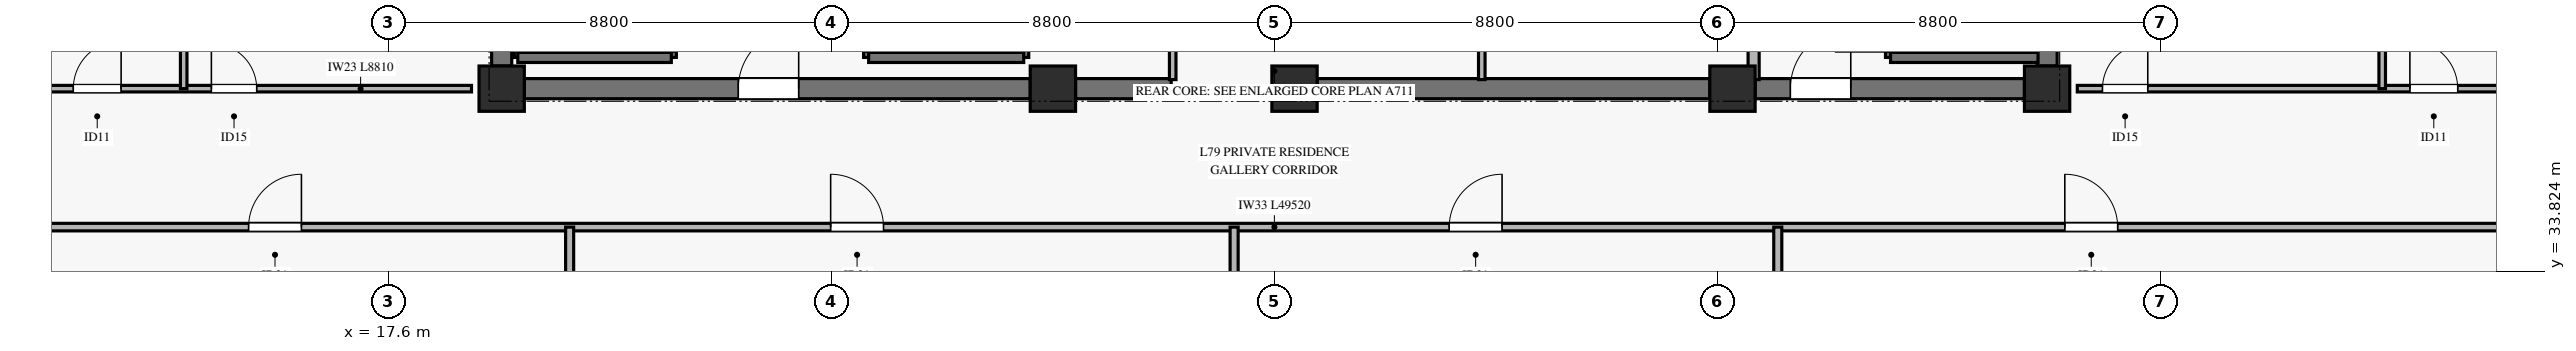
"""IFC4 building model, lengths in metres.
Left out: names, types, materials, properties, quantities, classifications, styles, units other than length and angle.
Written with IfcOpenShell. Run it as: python <this file> out.ifc"""

import sys

from ifc_helpers import new_model, si_unit, direction, frame, frame_2d, origin, origin_2d, place, context, subcontext, project, spatial, rectangle, extrude, source, transform, mapped, element, fill, save


model = new_model("IFC4")
c1 = context("Model", 3, precision=1e-05, world=origin(), true_north=direction((0.0, 1.0)))
c2 = subcontext(c1, "Body", "Model", "MODEL_VIEW")
j1 = project(units=[si_unit("LENGTHUNIT", "METRE"), si_unit("PLANEANGLEUNIT", "RADIAN")], contexts=[c1])
p1 = place(None, origin())
s1 = spatial("IfcSite", under=j1, at=p1, CompositionType="ELEMENT")
p2 = place(p1, origin())
s2 = spatial("IfcBuilding", under=s1, at=p2, CompositionType="ELEMENT")
p3 = place(p2, frame((0.0, 0.0, 307.4)))
s3 = spatial("IfcBuildingStorey", under=s2, at=p3, CompositionType="ELEMENT", Elevation=307.4)
m1 = source(origin(), c2, "Body", "SweptSolid", [
    extrude(rectangle(XDim=0.9, YDim=0.9, at=origin_2d()), origin(), (0.0, 0.0, 1.0), 3.185),
])
for number, where, z_axis, x_axis in (
    (1, (19.85, 37.45, 0.0), (0.0, 0.0, 1.0), (1.0, 0.0, 0.0)),
    (2, (30.8, 37.45, 0.0), (0.0, 0.0, 1.0), (1.0, 0.0, 0.0)),
    (3, (35.6, 37.45, 0.0), (0.0, 0.0, 1.0), (1.0, 0.0, 0.0)),
    (4, (44.3, 37.45, 0.0), (0.0, 0.0, 1.0), (1.0, 0.0, 0.0)),
    (5, (50.55, 37.45, 0.0), (0.0, 0.0, 1.0), (1.0, 0.0, 0.0)),
):
    element("IfcColumn", number, at=place(p3, frame(where, z_axis=z_axis, x_axis=x_axis)), inside=s3, PredefinedType="PILASTER", context=c2, shape_type="MappedRepresentation", body=[
        mapped(m1, transform((0.0, 0.0, 0.0), x_axis=(1.0, 0.0, 0.0), y_axis=(0.0, 1.0, 0.0), z_axis=(0.0, 0.0, 1.0), scale=1.0)),
    ])
p4 = place(p3, frame((20.3, 37.45, 0.0), z_axis=(0.0, 0.0, 1.0), x_axis=(1.0, 0.0, 0.0)))
e6 = element("IfcWall", 6, at=p4, inside=s3, PredefinedType="SHEAR", context=c2, shape_type="SweptSolid", body=[
    extrude(rectangle(XDim=10.05, YDim=0.4, at=frame_2d((5.025, 0.0))), origin(), (0.0, 0.0, 1.0), 3.185),
])
p5 = place(p4, frame((4.25, 0.0, 0.0)))
e7 = element("IfcOpeningElement", 7, at=p5, cuts=e6, PredefinedType="OPENING", context=c2, shape_type="SweptSolid", body=[
    extrude(rectangle(XDim=1.2, YDim=2.15, at=frame_2d((0.6, 1.075))), frame((0.0, 0.21, 0.0), z_axis=(0.0, -1.0, 0.0), x_axis=(1.0, 0.0, 0.0)), (0.0, 0.0, 1.0), 0.42),
])
p6 = place(p3, frame((31.25, 37.45, 0.0), z_axis=(0.0, 0.0, 1.0), x_axis=(1.0, 0.0, 0.0)))
e8 = element("IfcWall", 8, at=p6, inside=s3, PredefinedType="SHEAR", context=c2, shape_type="SweptSolid", body=[
    extrude(rectangle(XDim=1.9, YDim=0.4, at=frame_2d((0.95, 0.0))), origin(), (0.0, 0.0, 1.0), 3.185),
])
p7 = place(p3, frame((36.05, 37.45, 0.0), z_axis=(0.0, 0.0, 1.0), x_axis=(1.0, 0.0, 0.0)))
e9 = element("IfcWall", 9, at=p7, inside=s3, PredefinedType="SHEAR", context=c2, shape_type="SweptSolid", body=[
    extrude(rectangle(XDim=7.8, YDim=0.4, at=frame_2d((3.9, 0.0))), origin(), (0.0, 0.0, 1.0), 3.185),
])
p8 = place(p3, frame((44.75, 37.45, 0.0), z_axis=(0.0, 0.0, 1.0), x_axis=(1.0, 0.0, 0.0)))
e10 = element("IfcWall", 10, at=p8, inside=s3, PredefinedType="SHEAR", context=c2, shape_type="SweptSolid", body=[
    extrude(rectangle(XDim=5.35, YDim=0.4, at=frame_2d((2.675, 0.0))), origin(), (0.0, 0.0, 1.0), 3.185),
])
p9 = place(p8, frame((0.7, 0.0, 0.0)))
e11 = element("IfcOpeningElement", 11, at=p9, cuts=e10, PredefinedType="OPENING", context=c2, shape_type="SweptSolid", body=[
    extrude(rectangle(XDim=1.2, YDim=2.15, at=frame_2d((0.6, 1.075))), frame((0.0, 0.21, 0.0), z_axis=(0.0, -1.0, 0.0), x_axis=(1.0, 0.0, 0.0)), (0.0, 0.0, 1.0), 0.42),
])
for number, where, z_axis, x_axis in (
    (12, (19.85, 37.9, 0.0), (0.0, 0.0, 1.0), (0.0, 1.0, 0.0)),
    (13, (50.55, 37.9, 0.0), (0.0, 0.0, 1.0), (0.0, 1.0, 0.0)),
):
    element("IfcWall", number, at=place(p3, frame(where, z_axis=z_axis, x_axis=x_axis)), inside=s3, PredefinedType="SHEAR", context=c2, shape_type="SweptSolid", body=[
        extrude(rectangle(XDim=8.2, YDim=0.4, at=frame_2d((4.1, 0.0))), origin(), (0.0, 0.0, 1.0), 3.185),
    ])
p10 = place(p3, frame((20.17, 38.07, 0.0), z_axis=(0.0, 0.0, 1.0), x_axis=(0.0, 1.0, 0.0)))
e14 = element("IfcWall", 14, at=p10, inside=s3, PredefinedType="SOLIDWALL", context=c2, shape_type="SweptSolid", body=[
    extrude(rectangle(XDim=7.25, YDim=0.14, at=frame_2d((3.625, 0.0))), origin(), (0.0, 0.0, 1.0), 3.4),
])
p11 = place(p3, frame((23.22, 38.07, 0.0), z_axis=(0.0, 0.0, 1.0), x_axis=(0.0, 1.0, 0.0)))
e15 = element("IfcWall", 15, at=p11, inside=s3, PredefinedType="SOLIDWALL", context=c2, shape_type="SweptSolid", body=[
    extrude(rectangle(XDim=7.25, YDim=0.2, at=frame_2d((3.625, 0.0))), origin(), (0.0, 0.0, 1.0), 3.4),
])
p12 = place(p11, frame((0.11, 0.0, 0.0)))
e16 = element("IfcOpeningElement", 16, at=p12, cuts=e15, PredefinedType="OPENING", context=c2, shape_type="SweptSolid", body=[
    extrude(rectangle(XDim=1.1, YDim=2.15, at=frame_2d((0.55, 1.075))), frame((0.0, 0.11, 0.0), z_axis=(0.0, -1.0, 0.0), x_axis=(1.0, 0.0, 0.0)), (0.0, 0.0, 1.0), 0.22),
])
p13 = place(p3, frame((20.17, 38.07, 0.0), z_axis=(0.0, 0.0, 1.0), x_axis=(1.0, 0.0, 0.0)))
e17 = element("IfcWall", 17, at=p13, inside=s3, PredefinedType="SOLIDWALL", context=c2, shape_type="SweptSolid", body=[
    extrude(rectangle(XDim=3.05, YDim=0.2, at=frame_2d((1.525, 0.0))), origin(), (0.0, 0.0, 1.0), 3.4),
])
p14 = place(p3, frame((27.14, 38.07, 0.0), z_axis=(0.0, 0.0, 1.0), x_axis=(0.0, 1.0, 0.0)))
e18 = element("IfcWall", 18, at=p14, inside=s3, PredefinedType="SOLIDWALL", context=c2, shape_type="SweptSolid", body=[
    extrude(rectangle(XDim=7.25, YDim=0.2, at=frame_2d((3.625, 0.0))), origin(), (0.0, 0.0, 1.0), 3.4),
])
p15 = place(p14, frame((0.11, 0.0, 0.0)))
e19 = element("IfcOpeningElement", 19, at=p15, cuts=e18, PredefinedType="OPENING", context=c2, shape_type="SweptSolid", body=[
    extrude(rectangle(XDim=1.1, YDim=2.15, at=frame_2d((0.55, 1.075))), frame((0.0, 0.11, 0.0), z_axis=(0.0, -1.0, 0.0), x_axis=(1.0, 0.0, 0.0)), (0.0, 0.0, 1.0), 0.22),
])
p16 = place(p3, frame((30.22, 38.07, 0.0), z_axis=(0.0, 0.0, 1.0), x_axis=(0.0, 1.0, 0.0)))
e20 = element("IfcWall", 20, at=p16, inside=s3, PredefinedType="SOLIDWALL", context=c2, shape_type="SweptSolid", body=[
    extrude(rectangle(XDim=7.25, YDim=0.2, at=frame_2d((3.625, 0.0))), origin(), (0.0, 0.0, 1.0), 3.4),
])
p17 = place(p3, frame((27.14, 38.07, 0.0), z_axis=(0.0, 0.0, 1.0), x_axis=(1.0, 0.0, 0.0)))
e21 = element("IfcWall", 21, at=p17, inside=s3, PredefinedType="SOLIDWALL", context=c2, shape_type="SweptSolid", body=[
    extrude(rectangle(XDim=3.08, YDim=0.2, at=frame_2d((1.54, 0.0))), origin(), (0.0, 0.0, 1.0), 3.4),
])
p18 = place(p3, frame((47.44, 38.07, 0.0), z_axis=(0.0, 0.0, 1.0), x_axis=(0.0, 1.0, 0.0)))
e22 = element("IfcWall", 22, at=p18, inside=s3, PredefinedType="SOLIDWALL", context=c2, shape_type="SweptSolid", body=[
    extrude(rectangle(XDim=7.25, YDim=0.2, at=frame_2d((3.625, 0.0))), origin(), (0.0, 0.0, 1.0), 3.4),
])
p19 = place(p18, frame((0.11, 0.0, 0.0)))
e23 = element("IfcOpeningElement", 23, at=p19, cuts=e22, PredefinedType="OPENING", context=c2, shape_type="SweptSolid", body=[
    extrude(rectangle(XDim=1.1, YDim=2.15, at=frame_2d((0.55, 1.075))), frame((0.0, 0.11, 0.0), z_axis=(0.0, -1.0, 0.0), x_axis=(1.0, 0.0, 0.0)), (0.0, 0.0, 1.0), 0.22),
])
p20 = place(p3, frame((47.44, 38.07, 0.0), z_axis=(0.0, 0.0, 1.0), x_axis=(1.0, 0.0, 0.0)))
e24 = element("IfcWall", 24, at=p20, inside=s3, PredefinedType="SOLIDWALL", context=c2, shape_type="SweptSolid", body=[
    extrude(rectangle(XDim=2.93, YDim=0.2, at=frame_2d((1.465, 0.0))), origin(), (0.0, 0.0, 1.0), 3.4),
])
p21 = place(p3, frame((44.72, 37.63, 0.0), z_axis=(0.0, 0.0, 1.0), x_axis=(0.0, 1.0, 0.0)))
e25 = element("IfcWall", 25, at=p21, inside=s3, PredefinedType="SOLIDWALL", context=c2, shape_type="SweptSolid", body=[
    extrude(rectangle(XDim=7.59, YDim=0.22, at=frame_2d((3.795, 0.0))), origin(), (0.0, 0.0, 1.0), 3.185),
])
p22 = place(p3, frame((33.18, 37.63, 0.0), z_axis=(0.0, 0.0, 1.0), x_axis=(0.0, 1.0, 0.0)))
e26 = element("IfcWall", 26, at=p22, inside=s3, PredefinedType="PARTITIONING", context=c2, shape_type="SweptSolid", body=[
    extrude(rectangle(XDim=6.52, YDim=0.13, at=frame_2d((3.26, 0.0))), origin(), (0.0, 0.0, 1.0), 2.27),
])
p23 = place(p22, frame((2.27, 0.0, 0.0)))
e27 = element("IfcOpeningElement", 27, at=p23, cuts=e26, PredefinedType="OPENING", context=c2, shape_type="SweptSolid", body=[
    extrude(rectangle(XDim=0.9, YDim=2.1, at=frame_2d((0.45, 1.05))), frame((0.0, 0.075, 0.0), z_axis=(0.0, -1.0, 0.0), x_axis=(1.0, 0.0, 0.0)), (0.0, 0.0, 1.0), 0.15),
])
p24 = place(p3, frame((39.32, 37.63, 0.0), z_axis=(0.0, 0.0, 1.0), x_axis=(0.0, 1.0, 0.0)))
e28 = element("IfcWall", 28, at=p24, inside=s3, PredefinedType="PARTITIONING", context=c2, shape_type="SweptSolid", body=[
    extrude(rectangle(XDim=8.74, YDim=0.13, at=frame_2d((4.37, 0.0))), origin(), (0.0, 0.0, 1.0), 3.185),
])
p25 = place(p24, frame((4.89, 0.0, 0.0)))
e29 = element("IfcOpeningElement", 29, at=p25, cuts=e28, PredefinedType="OPENING", context=c2, shape_type="SweptSolid", body=[
    extrude(rectangle(XDim=0.9, YDim=2.1, at=frame_2d((0.45, 1.05))), frame((0.0, 0.075, 0.0), z_axis=(0.0, -1.0, 0.0), x_axis=(1.0, 0.0, 0.0)), (0.0, 0.0, 1.0), 0.15),
])
p26 = place(p3, frame((10.44, 34.7, 0.0), z_axis=(0.0, 0.0, 1.0), x_axis=(1.0, 0.0, 0.0)))
e30 = element("IfcWall", 30, at=p26, inside=s3, PredefinedType="PARTITIONING", context=c2, shape_type="SweptSolid", body=[
    extrude(rectangle(XDim=49.52, YDim=0.15, at=frame_2d((24.76, 0.0))), origin(), (0.0, 0.0, 1.0), 2.47),
])
p27 = place(p26, frame((4.382, 0.0, 0.0)))
e31 = element("IfcOpeningElement", 31, at=p27, cuts=e30, PredefinedType="OPENING", context=c2, shape_type="SweptSolid", body=[
    extrude(rectangle(XDim=1.05, YDim=2.15, at=frame_2d((0.525, 1.075))), frame((0.0, 0.085, 0.0), z_axis=(0.0, -1.0, 0.0), x_axis=(1.0, 0.0, 0.0)), (0.0, 0.0, 1.0), 0.17),
])
p28 = place(p26, frame((15.945, 0.0, 0.0)))
e32 = element("IfcOpeningElement", 32, at=p28, cuts=e30, PredefinedType="OPENING", context=c2, shape_type="SweptSolid", body=[
    extrude(rectangle(XDim=1.05, YDim=2.15, at=frame_2d((0.525, 1.075))), frame((0.0, 0.085, 0.0), z_axis=(0.0, -1.0, 0.0), x_axis=(1.0, 0.0, 0.0)), (0.0, 0.0, 1.0), 0.17),
])
p29 = place(p26, frame((28.233, 0.0, 0.0)))
e33 = element("IfcOpeningElement", 33, at=p29, cuts=e30, PredefinedType="OPENING", context=c2, shape_type="SweptSolid", body=[
    extrude(rectangle(XDim=1.05, YDim=2.15, at=frame_2d((0.525, 1.075))), frame((0.0, 0.085, 0.0), z_axis=(0.0, -1.0, 0.0), x_axis=(1.0, 0.0, 0.0)), (0.0, 0.0, 1.0), 0.17),
])
p30 = place(p26, frame((40.462, 0.0, 0.0)))
e34 = element("IfcOpeningElement", 34, at=p30, cuts=e30, PredefinedType="OPENING", context=c2, shape_type="SweptSolid", body=[
    extrude(rectangle(XDim=1.05, YDim=2.15, at=frame_2d((0.525, 1.075))), frame((0.0, 0.085, 0.0), z_axis=(0.0, -1.0, 0.0), x_axis=(1.0, 0.0, 0.0)), (0.0, 0.0, 1.0), 0.17),
])
for number, where, z_axis, x_axis in (
    (35, (21.2, 19.772, 0.0), (0.0, 0.0, 1.0), (0.0, 1.0, 0.0)),
    (36, (34.4, 19.772, 0.0), (0.0, 0.0, 1.0), (0.0, 1.0, 0.0)),
    (37, (45.2, 19.772, 0.0), (0.0, 0.0, 1.0), (0.0, 1.0, 0.0)),
):
    element("IfcWall", number, at=place(p3, frame(where, z_axis=z_axis, x_axis=x_axis)), inside=s3, PredefinedType="PARTITIONING", context=c2, shape_type="SweptSolid", body=[
        extrude(rectangle(XDim=14.928, YDim=0.16, at=frame_2d((7.464, 0.0))), origin(), (0.0, 0.0, 1.0), 2.77),
    ])
p31 = place(p3, frame((10.44, 37.45, 0.0), z_axis=(0.0, 0.0, 1.0), x_axis=(1.0, 0.0, 0.0)))
e38 = element("IfcWall", 38, at=p31, inside=s3, PredefinedType="PARTITIONING", context=c2, shape_type="SweptSolid", body=[
    extrude(rectangle(XDim=8.81, YDim=0.13, at=frame_2d((4.405, 0.0))), origin(), (0.0, 0.0, 1.0), 2.82),
])
p32 = place(p31, frame((0.9, 0.0, 0.0)))
e39 = element("IfcOpeningElement", 39, at=p32, cuts=e38, PredefinedType="OPENING", context=c2, shape_type="SweptSolid", body=[
    extrude(rectangle(XDim=0.95, YDim=2.1, at=frame_2d((0.475, 1.05))), frame((0.0, 0.075, 0.0), z_axis=(0.0, -1.0, 0.0), x_axis=(1.0, 0.0, 0.0)), (0.0, 0.0, 1.0), 0.15),
])
p33 = place(p31, frame((3.643, 0.0, 0.0)))
e40 = element("IfcOpeningElement", 40, at=p33, cuts=e38, PredefinedType="OPENING", context=c2, shape_type="SweptSolid", body=[
    extrude(rectangle(XDim=0.9, YDim=2.1, at=frame_2d((0.45, 1.05))), frame((0.0, 0.075, 0.0), z_axis=(0.0, -1.0, 0.0), x_axis=(1.0, 0.0, 0.0)), (0.0, 0.0, 1.0), 0.15),
])
p34 = place(p3, frame((13.533, 37.45, 0.0), z_axis=(0.0, 0.0, 1.0), x_axis=(0.0, 1.0, 0.0)))
e41 = element("IfcWall", 41, at=p34, inside=s3, PredefinedType="PARTITIONING", context=c2, shape_type="SweptSolid", body=[
    extrude(rectangle(XDim=8.8, YDim=0.13, at=frame_2d((4.4, 0.0))), origin(), (0.0, 0.0, 1.0), 3.185),
])
p35 = place(p3, frame((51.15, 37.45, 0.0), z_axis=(0.0, 0.0, 1.0), x_axis=(1.0, 0.0, 0.0)))
e42 = element("IfcWall", 42, at=p35, inside=s3, PredefinedType="PARTITIONING", context=c2, shape_type="SweptSolid", body=[
    extrude(rectangle(XDim=8.81, YDim=0.13, at=frame_2d((4.405, 0.0))), origin(), (0.0, 0.0, 1.0), 2.82),
])
p36 = place(p35, frame((0.5, 0.0, 0.0)))
e43 = element("IfcOpeningElement", 43, at=p36, cuts=e42, PredefinedType="OPENING", context=c2, shape_type="SweptSolid", body=[
    extrude(rectangle(XDim=0.9, YDim=2.1, at=frame_2d((0.45, 1.05))), frame((0.0, 0.075, 0.0), z_axis=(0.0, -1.0, 0.0), x_axis=(1.0, 0.0, 0.0)), (0.0, 0.0, 1.0), 0.15),
])
p37 = place(p35, frame((6.607, 0.0, 0.0)))
e44 = element("IfcOpeningElement", 44, at=p37, cuts=e42, PredefinedType="OPENING", context=c2, shape_type="SweptSolid", body=[
    extrude(rectangle(XDim=0.95, YDim=2.1, at=frame_2d((0.475, 1.05))), frame((0.0, 0.075, 0.0), z_axis=(0.0, -1.0, 0.0), x_axis=(1.0, 0.0, 0.0)), (0.0, 0.0, 1.0), 0.15),
])
p38 = place(p3, frame((57.207, 37.45, 0.0), z_axis=(0.0, 0.0, 1.0), x_axis=(0.0, 1.0, 0.0)))
e45 = element("IfcWall", 45, at=p38, inside=s3, PredefinedType="PARTITIONING", context=c2, shape_type="SweptSolid", body=[
    extrude(rectangle(XDim=8.8, YDim=0.13, at=frame_2d((4.4, 0.0))), origin(), (0.0, 0.0, 1.0), 2.82),
])
m2 = source(origin(), c2, "Body", "SweptSolid", [
    extrude(rectangle(XDim=1.2, YDim=2.15, at=frame_2d((0.6, 1.075))), frame((0.0, 0.025, 0.0), z_axis=(0.0, -1.0, 0.0), x_axis=(1.0, 0.0, 0.0)), (0.0, 0.0, 1.0), 0.05),
])
p39 = place(p5, origin())
e46 = element("IfcDoor", 46, at=p39, inside=s3, OperationType="SINGLE_SWING_RIGHT", PredefinedType="DOOR", context=c2, shape_type="MappedRepresentation", body=[
    mapped(m2, transform((0.0, 0.0, 0.0), x_axis=(1.0, 0.0, 0.0), y_axis=(0.0, 1.0, 0.0), z_axis=(0.0, 0.0, 1.0), scale=1.0)),
])
fill(e7, e46)
p40 = place(p9, origin())
e47 = element("IfcDoor", 47, at=p40, inside=s3, OperationType="SINGLE_SWING_RIGHT", PredefinedType="DOOR", context=c2, shape_type="MappedRepresentation", body=[
    mapped(m2, transform((0.0, 0.0, 0.0), x_axis=(1.0, 0.0, 0.0), y_axis=(0.0, 1.0, 0.0), z_axis=(0.0, 0.0, 1.0), scale=1.0)),
])
fill(e11, e47)
m3 = source(origin(), c2, "Body", "SweptSolid", [
    extrude(rectangle(XDim=1.05, YDim=2.15, at=frame_2d((0.525, 1.075))), frame((0.0, 0.025, 0.0), z_axis=(0.0, -1.0, 0.0), x_axis=(1.0, 0.0, 0.0)), (0.0, 0.0, 1.0), 0.05),
])
p41 = place(p27, origin())
e48 = element("IfcDoor", 48, at=p41, inside=s3, OperationType="SINGLE_SWING_RIGHT", PredefinedType="DOOR", context=c2, shape_type="MappedRepresentation", body=[
    mapped(m3, transform((0.0, 0.0, 0.0), x_axis=(1.0, 0.0, 0.0), y_axis=(0.0, 1.0, 0.0), z_axis=(0.0, 0.0, 1.0), scale=1.0)),
])
fill(e31, e48)
p42 = place(p28, origin())
e49 = element("IfcDoor", 49, at=p42, inside=s3, OperationType="SINGLE_SWING_LEFT", PredefinedType="DOOR", context=c2, shape_type="MappedRepresentation", body=[
    mapped(m3, transform((0.0, 0.0, 0.0), x_axis=(1.0, 0.0, 0.0), y_axis=(0.0, 1.0, 0.0), z_axis=(0.0, 0.0, 1.0), scale=1.0)),
])
fill(e32, e49)
p43 = place(p29, origin())
e50 = element("IfcDoor", 50, at=p43, inside=s3, OperationType="SINGLE_SWING_RIGHT", PredefinedType="DOOR", context=c2, shape_type="MappedRepresentation", body=[
    mapped(m3, transform((0.0, 0.0, 0.0), x_axis=(1.0, 0.0, 0.0), y_axis=(0.0, 1.0, 0.0), z_axis=(0.0, 0.0, 1.0), scale=1.0)),
])
fill(e33, e50)
p44 = place(p30, origin())
e51 = element("IfcDoor", 51, at=p44, inside=s3, OperationType="SINGLE_SWING_LEFT", PredefinedType="DOOR", context=c2, shape_type="MappedRepresentation", body=[
    mapped(m3, transform((0.0, 0.0, 0.0), x_axis=(1.0, 0.0, 0.0), y_axis=(0.0, 1.0, 0.0), z_axis=(0.0, 0.0, 1.0), scale=1.0)),
])
fill(e34, e51)
m4 = source(origin(), c2, "Body", "SweptSolid", [
    extrude(rectangle(XDim=0.95, YDim=2.1, at=frame_2d((0.475, 1.05))), frame((0.0, 0.025, 0.0), z_axis=(0.0, -1.0, 0.0), x_axis=(1.0, 0.0, 0.0)), (0.0, 0.0, 1.0), 0.05),
])
p45 = place(p32, origin())
e52 = element("IfcDoor", 52, at=p45, inside=s3, OperationType="SINGLE_SWING_RIGHT", PredefinedType="DOOR", context=c2, shape_type="MappedRepresentation", body=[
    mapped(m4, transform((0.0, 0.0, 0.0), x_axis=(1.0, 0.0, 0.0), y_axis=(0.0, 1.0, 0.0), z_axis=(0.0, 0.0, 1.0), scale=1.0)),
])
fill(e39, e52)
m5 = source(origin(), c2, "Body", "SweptSolid", [
    extrude(rectangle(XDim=0.9, YDim=2.1, at=frame_2d((0.45, 1.05))), frame((0.0, 0.025, 0.0), z_axis=(0.0, -1.0, 0.0), x_axis=(1.0, 0.0, 0.0)), (0.0, 0.0, 1.0), 0.05),
])
p46 = place(p33, origin())
e53 = element("IfcDoor", 53, at=p46, inside=s3, OperationType="SINGLE_SWING_LEFT", PredefinedType="DOOR", context=c2, shape_type="MappedRepresentation", body=[
    mapped(m5, transform((0.0, 0.0, 0.0), x_axis=(1.0, 0.0, 0.0), y_axis=(0.0, 1.0, 0.0), z_axis=(0.0, 0.0, 1.0), scale=1.0)),
])
fill(e40, e53)
p47 = place(p36, origin())
e54 = element("IfcDoor", 54, at=p47, inside=s3, OperationType="SINGLE_SWING_RIGHT", PredefinedType="DOOR", context=c2, shape_type="MappedRepresentation", body=[
    mapped(m5, transform((0.0, 0.0, 0.0), x_axis=(1.0, 0.0, 0.0), y_axis=(0.0, 1.0, 0.0), z_axis=(0.0, 0.0, 1.0), scale=1.0)),
])
fill(e43, e54)
p48 = place(p37, origin())
e55 = element("IfcDoor", 55, at=p48, inside=s3, OperationType="SINGLE_SWING_LEFT", PredefinedType="DOOR", context=c2, shape_type="MappedRepresentation", body=[
    mapped(m4, transform((0.0, 0.0, 0.0), x_axis=(1.0, 0.0, 0.0), y_axis=(0.0, 1.0, 0.0), z_axis=(0.0, 0.0, 1.0), scale=1.0)),
])
fill(e44, e55)
save(model, sys.argv[1])
